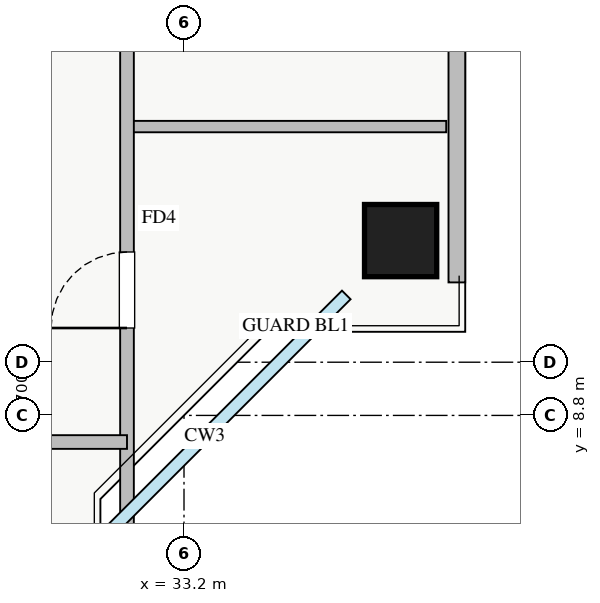
"""IFC4 building model, lengths in metres.
Left out: names, types, materials, properties, quantities, classifications, styles, units other than length and angle.
Written with IfcOpenShell. Run it as: python <this file> out.ifc"""

import sys

from ifc_helpers import new_model, si_unit, direction, frame, frame_2d, origin, origin_2d, place, context, subcontext, project, spatial, rectangle, extrude, source, transform, mapped, element, fill, save


model = new_model("IFC4")
c1 = context("Model", 3, precision=1e-05, world=origin(), true_north=direction((0.0, 1.0)))
c2 = subcontext(c1, "Body", "Model", "MODEL_VIEW")
j1 = project(units=[si_unit("LENGTHUNIT", "METRE"), si_unit("PLANEANGLEUNIT", "RADIAN")], contexts=[c1])
p1 = place(None, origin())
s1 = spatial("IfcSite", under=j1, at=p1, CompositionType="ELEMENT")
p2 = place(p1, origin())
s2 = spatial("IfcBuilding", under=s1, at=p2, CompositionType="ELEMENT")
p3 = place(p2, frame((0.0, 0.0, 163.25)))
s3 = spatial("IfcBuildingStorey", under=s2, at=p3, CompositionType="ELEMENT", Elevation=163.25)
m1 = source(origin(), c2, "Body", "SweptSolid", [
    extrude(rectangle(XDim=0.95, YDim=0.95, at=origin_2d()), origin(), (0.0, 0.0, 1.0), 3.25),
])
p4 = place(p3, frame((36.05, 11.1, 0.0), z_axis=(0.0, 0.0, 1.0), x_axis=(1.0, 0.0, 0.0)))
e1 = element("IfcColumn", 1, at=p4, inside=s3, PredefinedType="COLUMN", context=c2, shape_type="MappedRepresentation", body=[
    mapped(m1, transform((0.0, 0.0, 0.0), x_axis=(1.0, 0.0, 0.0), y_axis=(0.0, 1.0, 0.0), z_axis=(0.0, 0.0, 1.0), scale=1.0)),
])
p5 = place(p3, frame((36.79, 10.55, 0.0), z_axis=(0.0, 0.0, 1.0), x_axis=(0.0, 1.0, 0.0)))
e2 = element("IfcWall", 2, at=p5, inside=s3, PredefinedType="STANDARD", context=c2, shape_type="SweptSolid", body=[
    extrude(rectangle(XDim=6.3, YDim=0.22, at=frame_2d((3.15, 0.0))), origin(), (0.0, 0.0, 1.0), 2.61),
])
p6 = place(p3, frame((32.45, 12.6, 0.0), z_axis=(0.0, 0.0, 1.0), x_axis=(1.0, 0.0, 0.0)))
e3 = element("IfcWall", 3, at=p6, inside=s3, PredefinedType="PARTITIONING", context=c2, shape_type="SweptSolid", body=[
    extrude(rectangle(XDim=4.2, YDim=0.15, at=frame_2d((2.1, 0.0))), origin(), (0.0, 0.0, 1.0), 3.07),
])
p7 = place(p3, frame((32.45, 5.35, 0.0), z_axis=(0.0, 0.0, 1.0), x_axis=(0.0, 1.0, 0.0)))
e4 = element("IfcWall", 4, at=p7, inside=s3, PredefinedType="PARTITIONING", context=c2, shape_type="SweptSolid", body=[
    extrude(rectangle(XDim=11.35, YDim=0.18, at=frame_2d((5.675, 0.0))), origin(), (0.0, 0.0, 1.0), 3.07),
])
p8 = place(p7, frame((4.6, 0.0, 0.0)))
e5 = element("IfcOpeningElement", 5, at=p8, cuts=e4, PredefinedType="OPENING", context=c2, shape_type="SweptSolid", body=[
    extrude(rectangle(XDim=1.0, YDim=2.05, at=frame_2d((0.5, 1.025))), frame((0.0, 0.1, 0.0), z_axis=(0.0, -1.0, 0.0), x_axis=(1.0, 0.0, 0.0)), (0.0, 0.0, 1.0), 0.2),
])
p9 = place(p7, frame((8.8, 0.0, 0.0)))
e6 = element("IfcOpeningElement", 6, at=p9, cuts=e4, PredefinedType="OPENING", context=c2, shape_type="SweptSolid", body=[
    extrude(rectangle(XDim=1.0, YDim=2.05, at=frame_2d((0.5, 1.025))), frame((0.0, 0.1, 0.0), z_axis=(0.0, -1.0, 0.0), x_axis=(1.0, 0.0, 0.0)), (0.0, 0.0, 1.0), 0.2),
])
p10 = place(p3, frame((8.65, 8.45, 0.0), z_axis=(0.0, 0.0, 1.0), x_axis=(1.0, 0.0, 0.0)))
e7 = element("IfcWall", 7, at=p10, inside=s3, PredefinedType="PARTITIONING", context=c2, shape_type="SweptSolid", body=[
    extrude(rectangle(XDim=23.8, YDim=0.18, at=frame_2d((11.9, 0.0))), origin(), (0.0, 0.0, 1.0), 3.07),
])
p11 = place(p10, frame((5.425, 0.0, 0.0)))
e8 = element("IfcOpeningElement", 8, at=p11, cuts=e7, PredefinedType="OPENING", context=c2, shape_type="SweptSolid", body=[
    extrude(rectangle(XDim=1.0, YDim=2.05, at=frame_2d((0.5, 1.025))), frame((0.0, 0.1, 0.0), z_axis=(0.0, -1.0, 0.0), x_axis=(1.0, 0.0, 0.0)), (0.0, 0.0, 1.0), 0.2),
])
p12 = place(p10, frame((17.325, 0.0, 0.0)))
e9 = element("IfcOpeningElement", 9, at=p12, cuts=e7, PredefinedType="OPENING", context=c2, shape_type="SweptSolid", body=[
    extrude(rectangle(XDim=1.0, YDim=2.05, at=frame_2d((0.5, 1.025))), frame((0.0, 0.1, 0.0), z_axis=(0.0, -1.0, 0.0), x_axis=(1.0, 0.0, 0.0)), (0.0, 0.0, 1.0), 0.2),
])
m2 = source(origin(), c2, "Body", "SweptSolid", [
    extrude(rectangle(XDim=1.0, YDim=2.05, at=frame_2d((0.5, 1.025))), frame((0.0, 0.025, 0.0), z_axis=(0.0, -1.0, 0.0), x_axis=(1.0, 0.0, 0.0)), (0.0, 0.0, 1.0), 0.05),
])
p13 = place(p8, origin())
e10 = element("IfcDoor", 10, at=p13, inside=s3, OperationType="SINGLE_SWING_LEFT", PredefinedType="DOOR", context=c2, shape_type="MappedRepresentation", body=[
    mapped(m2, transform((0.0, 0.0, 0.0), x_axis=(1.0, 0.0, 0.0), y_axis=(0.0, 1.0, 0.0), z_axis=(0.0, 0.0, 1.0), scale=1.0)),
])
fill(e5, e10)
save(model, sys.argv[1])
